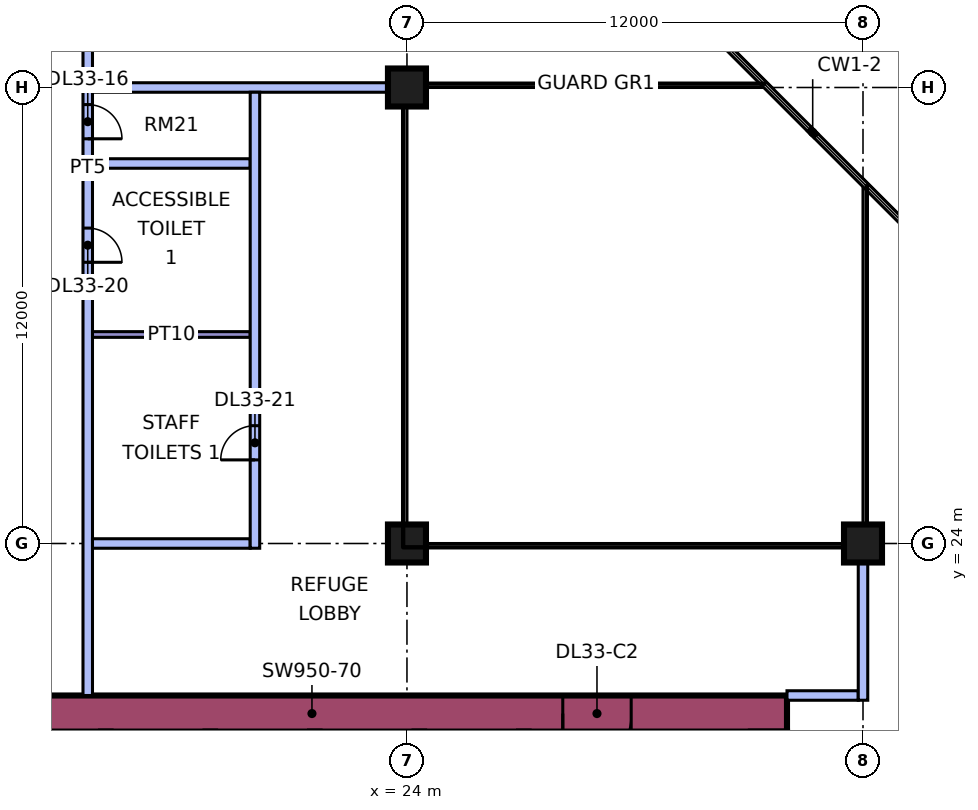
"""IFC4 building model, lengths in metres.
Left out: names, types, materials, properties, quantities, classifications, styles, units other than length and angle.
Written with IfcOpenShell. Run it as: python <this file> out.ifc"""

import sys

from ifc_helpers import new_model, si_unit, direction, frame, frame_2d, origin, origin_2d, place, context, subcontext, project, spatial, rectangle, extrude, element, fill, save


model = new_model("IFC4")
c1 = context("Model", 3, precision=1e-05, world=origin(), true_north=direction((0.0, 1.0)))
c2 = subcontext(c1, "Body", "Model", "MODEL_VIEW")
j1 = project(units=[si_unit("LENGTHUNIT", "METRE"), si_unit("PLANEANGLEUNIT", "RADIAN")], contexts=[c1])
p1 = place(None, origin())
s1 = spatial("IfcSite", under=j1, at=p1, CompositionType="ELEMENT")
p2 = place(p1, origin())
s2 = spatial("IfcBuilding", under=s1, at=p2, CompositionType="ELEMENT")
p3 = place(p2, frame((0.0, 0.0, 140.65)))
s3 = spatial("IfcBuildingStorey", under=s2, at=p3, CompositionType="ELEMENT", Elevation=140.65)
for number, where, z_axis, x_axis in (
    (1, (24.0, 24.0, 0.0), (0.0, 0.0, 1.0), (1.0, 0.0, 0.0)),
    (2, (24.0, 36.0, 0.0), (0.0, 0.0, 1.0), (1.0, 0.0, 0.0)),
    (3, (36.0, 24.0, 0.0), (0.0, 0.0, 1.0), (1.0, 0.0, 0.0)),
):
    element("IfcColumn", number, at=place(p3, frame(where, z_axis=z_axis, x_axis=x_axis)), inside=s3, PredefinedType="COLUMN", context=c2, shape_type="SweptSolid", body=[
        extrude(rectangle(XDim=1.0, YDim=1.0, at=origin_2d()), origin(), (0.0, 0.0, 1.0), 5.5),
    ])
p4 = place(p3, frame((9.0, 19.525, 0.0), z_axis=(0.0, 0.0, 1.0), x_axis=(1.0, 0.0, 0.0)))
e4 = element("IfcWall", 4, at=p4, inside=s3, PredefinedType="SHEAR", context=c2, shape_type="SweptSolid", body=[
    extrude(rectangle(XDim=25.0, YDim=0.95, at=frame_2d((12.5, 0.0))), origin(), (0.0, 0.0, 1.0), 5.5),
])
p5 = place(p4, frame((19.1, 0.0, 0.0)))
e5 = element("IfcOpeningElement", 5, at=p5, cuts=e4, PredefinedType="OPENING", context=c2, shape_type="SweptSolid", body=[
    extrude(rectangle(XDim=1.8, YDim=2.4, at=frame_2d((0.9, 1.2))), frame((0.0, 0.485, 0.0), z_axis=(0.0, -1.0, 0.0), x_axis=(1.0, 0.0, 0.0)), (0.0, 0.0, 1.0), 0.97),
])
p6 = place(p3, frame((15.6, 20.0, 0.0), z_axis=(0.0, 0.0, 1.0), x_axis=(0.0, 1.0, 0.0)))
e6 = element("IfcWall", 6, at=p6, inside=s3, PredefinedType="PARTITIONING", context=c2, shape_type="SweptSolid", body=[
    extrude(rectangle(XDim=27.775, YDim=0.25, at=frame_2d((13.887, 0.0))), origin(), (0.0, 0.0, 1.0), 5.05),
])
p7 = place(p6, frame((19.15, 0.0, 0.0)))
e7 = element("IfcOpeningElement", 7, at=p7, cuts=e6, PredefinedType="OPENING", context=c2, shape_type="SweptSolid", body=[
    extrude(rectangle(XDim=1.8, YDim=2.1, at=frame_2d((0.9, 1.05))), frame((0.0, 0.135, 0.0), z_axis=(0.0, -1.0, 0.0), x_axis=(1.0, 0.0, 0.0)), (0.0, 0.0, 1.0), 0.27),
])
p8 = place(p6, frame((24.9, 0.0, 0.0)))
e8 = element("IfcOpeningElement", 8, at=p8, cuts=e6, PredefinedType="OPENING", context=c2, shape_type="SweptSolid", body=[
    extrude(rectangle(XDim=1.8, YDim=2.1, at=frame_2d((0.9, 1.05))), frame((0.0, 0.135, 0.0), z_axis=(0.0, -1.0, 0.0), x_axis=(1.0, 0.0, 0.0)), (0.0, 0.0, 1.0), 0.27),
])
p9 = place(p6, frame((14.65, 0.0, 0.0)))
e9 = element("IfcOpeningElement", 9, at=p9, cuts=e6, PredefinedType="OPENING", context=c2, shape_type="SweptSolid", body=[
    extrude(rectangle(XDim=0.9, YDim=2.1, at=frame_2d((0.45, 1.05))), frame((0.0, 0.135, 0.0), z_axis=(0.0, -1.0, 0.0), x_axis=(1.0, 0.0, 0.0)), (0.0, 0.0, 1.0), 0.27),
])
p10 = place(p6, frame((11.4, 0.0, 0.0)))
e10 = element("IfcOpeningElement", 10, at=p10, cuts=e6, PredefinedType="OPENING", context=c2, shape_type="SweptSolid", body=[
    extrude(rectangle(XDim=0.9, YDim=2.1, at=frame_2d((0.45, 1.05))), frame((0.0, 0.135, 0.0), z_axis=(0.0, -1.0, 0.0), x_axis=(1.0, 0.0, 0.0)), (0.0, 0.0, 1.0), 0.27),
])
p11 = place(p3, frame((15.725, 24.0, 0.0), z_axis=(0.0, 0.0, 1.0), x_axis=(1.0, 0.0, 0.0)))
e11 = element("IfcWall", 11, at=p11, inside=s3, PredefinedType="PARTITIONING", context=c2, shape_type="SweptSolid", body=[
    extrude(rectangle(XDim=4.15, YDim=0.25, at=frame_2d((2.075, 0.0))), origin(), (0.0, 0.0, 1.0), 5.05),
])
p12 = place(p3, frame((15.725, 29.5, 0.0), z_axis=(0.0, 0.0, 1.0), x_axis=(1.0, 0.0, 0.0)))
e12 = element("IfcWall", 12, at=p12, inside=s3, PredefinedType="PARTITIONING", context=c2, shape_type="SweptSolid", body=[
    extrude(rectangle(XDim=4.15, YDim=0.15, at=frame_2d((2.075, 0.0))), origin(), (0.0, 0.0, 1.0), 5.05),
])
p13 = place(p3, frame((15.725, 34.0, 0.0), z_axis=(0.0, 0.0, 1.0), x_axis=(1.0, 0.0, 0.0)))
e13 = element("IfcWall", 13, at=p13, inside=s3, PredefinedType="PARTITIONING", context=c2, shape_type="SweptSolid", body=[
    extrude(rectangle(XDim=4.15, YDim=0.25, at=frame_2d((2.075, 0.0))), origin(), (0.0, 0.0, 1.0), 5.05),
])
p14 = place(p3, frame((15.725, 36.0, 0.0), z_axis=(0.0, 0.0, 1.0), x_axis=(1.0, 0.0, 0.0)))
e14 = element("IfcWall", 14, at=p14, inside=s3, PredefinedType="PARTITIONING", context=c2, shape_type="SweptSolid", body=[
    extrude(rectangle(XDim=8.275, YDim=0.25, at=frame_2d((4.137, 0.0))), origin(), (0.0, 0.0, 1.0), 5.05),
])
p15 = place(p3, frame((20.0, 23.875, 0.0), z_axis=(0.0, 0.0, 1.0), x_axis=(0.0, 1.0, 0.0)))
e15 = element("IfcWall", 15, at=p15, inside=s3, PredefinedType="PARTITIONING", context=c2, shape_type="SweptSolid", body=[
    extrude(rectangle(XDim=12.0, YDim=0.25, at=frame_2d((6.0, 0.0))), origin(), (0.0, 0.0, 1.0), 5.05),
])
p16 = place(p15, frame((2.325, 0.0, 0.0)))
e16 = element("IfcOpeningElement", 16, at=p16, cuts=e15, PredefinedType="OPENING", context=c2, shape_type="SweptSolid", body=[
    extrude(rectangle(XDim=0.9, YDim=2.1, at=frame_2d((0.45, 1.05))), frame((0.0, 0.135, 0.0), z_axis=(0.0, -1.0, 0.0), x_axis=(1.0, 0.0, 0.0)), (0.0, 0.0, 1.0), 0.27),
])
p17 = place(p3, frame((34.0, 20.0, 0.0), z_axis=(0.0, 0.0, 1.0), x_axis=(1.0, 0.0, 0.0)))
e17 = element("IfcWall", 17, at=p17, inside=s3, PredefinedType="PARTITIONING", context=c2, shape_type="SweptSolid", body=[
    extrude(rectangle(XDim=1.875, YDim=0.25, at=frame_2d((0.938, 0.0))), origin(), (0.0, 0.0, 1.0), 5.05),
])
p18 = place(p3, frame((36.0, 19.875, 0.0), z_axis=(0.0, 0.0, 1.0), x_axis=(0.0, 1.0, 0.0)))
e18 = element("IfcWall", 18, at=p18, inside=s3, PredefinedType="PARTITIONING", context=c2, shape_type="SweptSolid", body=[
    extrude(rectangle(XDim=4.125, YDim=0.25, at=frame_2d((2.062, 0.0))), origin(), (0.0, 0.0, 1.0), 5.05),
])
p19 = place(p5, frame((1.8, 0.0, 0.0), z_axis=(0.0, 0.0, 1.0), x_axis=(-1.0, 0.0, 0.0)))
e19 = element("IfcDoor", 19, at=p19, inside=s3, OperationType="DOUBLE_DOOR_SINGLE_SWING", PredefinedType="DOOR", context=c2, shape_type="SweptSolid", body=[
    extrude(rectangle(XDim=1.8, YDim=2.4, at=frame_2d((0.9, 1.2))), frame((0.0, 0.025, 0.0), z_axis=(0.0, -1.0, 0.0), x_axis=(1.0, 0.0, 0.0)), (0.0, 0.0, 1.0), 0.05),
])
fill(e5, e19)
p20 = place(p9, frame((0.9, 0.0, 0.0), z_axis=(0.0, 0.0, 1.0), x_axis=(-1.0, 0.0, 0.0)))
e20 = element("IfcDoor", 20, at=p20, inside=s3, OperationType="SINGLE_SWING_LEFT", PredefinedType="DOOR", context=c2, shape_type="SweptSolid", body=[
    extrude(rectangle(XDim=0.9, YDim=2.1, at=frame_2d((0.45, 1.05))), frame((0.0, 0.025, 0.0), z_axis=(0.0, -1.0, 0.0), x_axis=(1.0, 0.0, 0.0)), (0.0, 0.0, 1.0), 0.05),
])
fill(e9, e20)
p21 = place(p10, frame((0.9, 0.0, 0.0), z_axis=(0.0, 0.0, 1.0), x_axis=(-1.0, 0.0, 0.0)))
e21 = element("IfcDoor", 21, at=p21, inside=s3, OperationType="SINGLE_SWING_LEFT", PredefinedType="DOOR", context=c2, shape_type="SweptSolid", body=[
    extrude(rectangle(XDim=0.9, YDim=2.1, at=frame_2d((0.45, 1.05))), frame((0.0, 0.025, 0.0), z_axis=(0.0, -1.0, 0.0), x_axis=(1.0, 0.0, 0.0)), (0.0, 0.0, 1.0), 0.05),
])
fill(e10, e21)
p22 = place(p16, origin())
e22 = element("IfcDoor", 22, at=p22, inside=s3, OperationType="SINGLE_SWING_LEFT", PredefinedType="DOOR", context=c2, shape_type="SweptSolid", body=[
    extrude(rectangle(XDim=0.9, YDim=2.1, at=frame_2d((0.45, 1.05))), frame((0.0, 0.025, 0.0), z_axis=(0.0, -1.0, 0.0), x_axis=(1.0, 0.0, 0.0)), (0.0, 0.0, 1.0), 0.05),
])
fill(e16, e22)
save(model, sys.argv[1])
